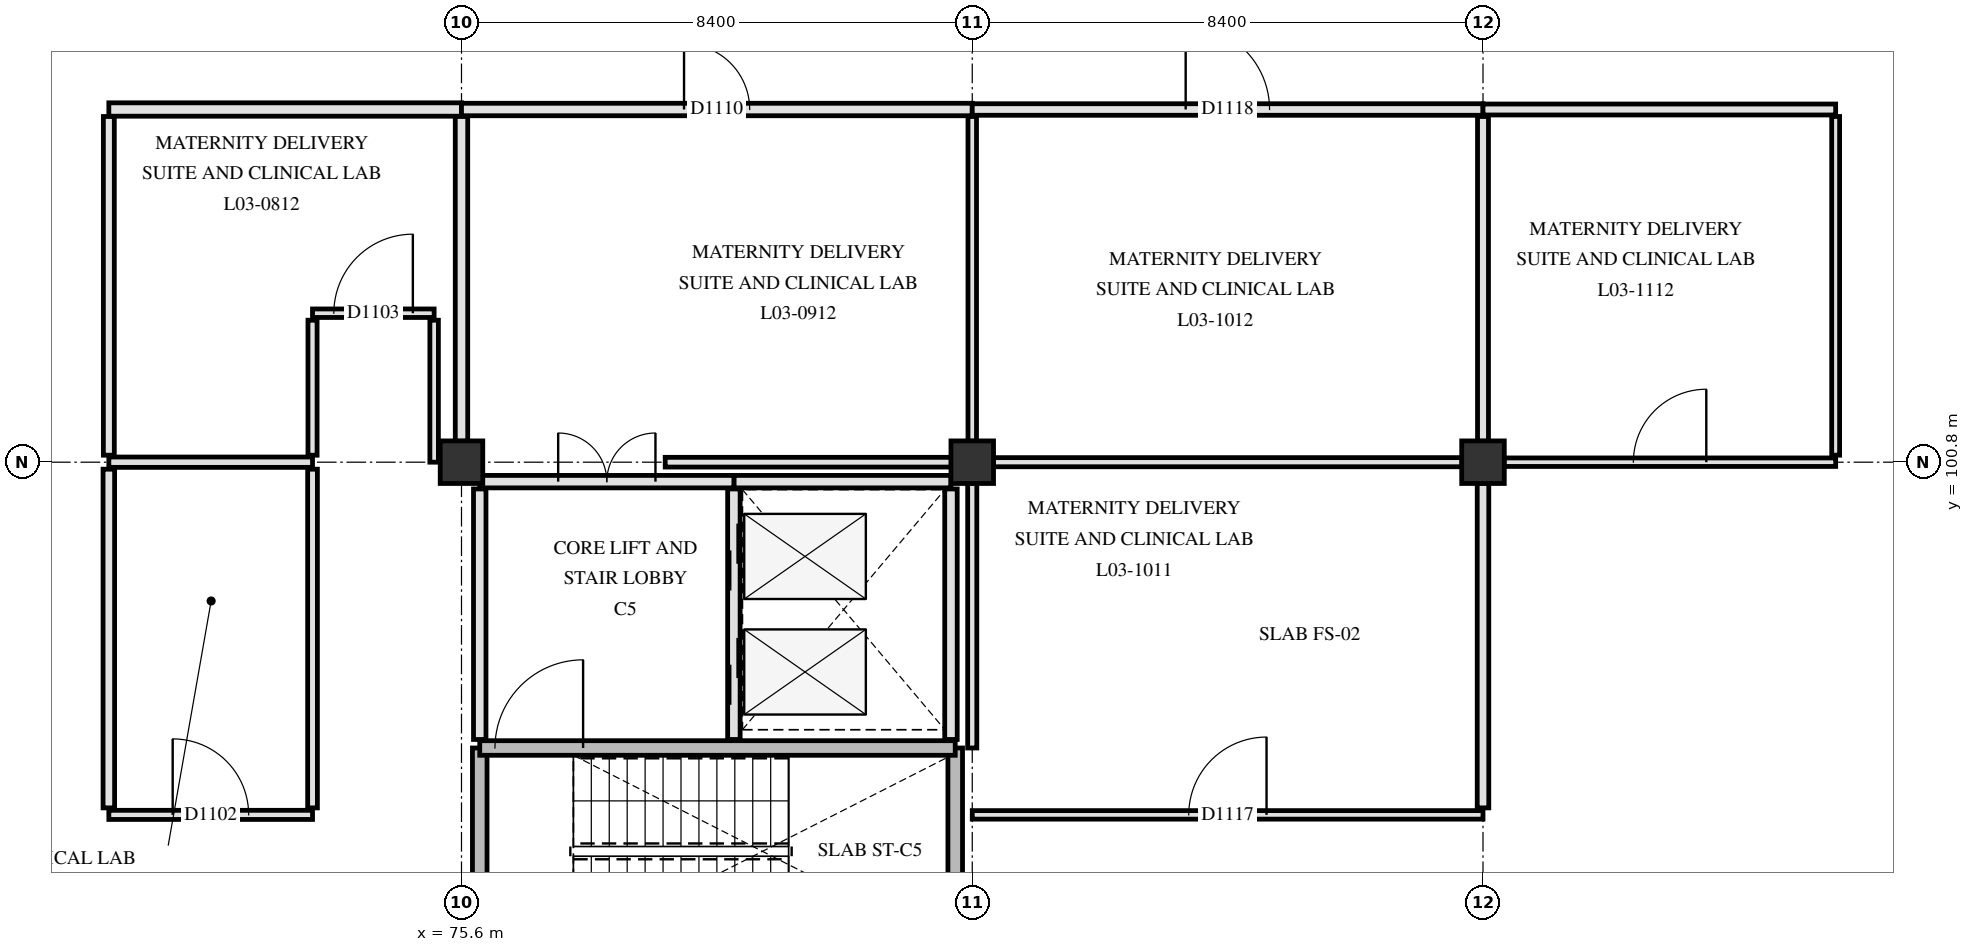
"""IFC4 building model, lengths in metres.
Left out: names, types, materials, properties, quantities, classifications, styles, units other than length and angle.
Written with IfcOpenShell. Run it as: python <this file> out.ifc"""

import sys

from ifc_helpers import new_model, si_unit, direction, frame, frame_2d, origin, origin_2d, place, context, subcontext, project, spatial, rectangle, extrude, element, fill, save


model = new_model("IFC4")
c1 = context("Model", 3, precision=1e-05, world=origin(), true_north=direction((0.0, 1.0)))
c2 = subcontext(c1, "Body", "Model", "MODEL_VIEW")
j1 = project(units=[si_unit("LENGTHUNIT", "METRE"), si_unit("PLANEANGLEUNIT", "RADIAN")], contexts=[c1])
p1 = place(None, origin())
s1 = spatial("IfcSite", under=j1, at=p1, CompositionType="ELEMENT")
p2 = place(p1, origin())
s2 = spatial("IfcBuilding", under=s1, at=p2, CompositionType="ELEMENT")
p3 = place(p2, frame((0.0, 0.0, 14.4)))
s3 = spatial("IfcBuildingStorey", under=s2, at=p3, CompositionType="ELEMENT", Elevation=14.4)
for number, where, z_axis, x_axis in (
    (1, (75.6, 100.8, 0.0), (0.0, 0.0, 1.0), (1.0, 0.0, 0.0)),
    (2, (84.0, 100.8, 0.0), (0.0, 0.0, 1.0), (1.0, 0.0, 0.0)),
    (3, (92.4, 100.8, 0.0), (0.0, 0.0, 1.0), (1.0, 0.0, 0.0)),
):
    element("IfcColumn", number, at=place(p3, frame(where, z_axis=z_axis, x_axis=x_axis)), inside=s3, PredefinedType="COLUMN", context=c2, shape_type="SweptSolid", body=[
        extrude(rectangle(XDim=0.7, YDim=0.7, at=origin_2d()), origin(), (0.0, 0.0, 1.0), 4.2),
    ])
for number, where, z_axis, x_axis in (
    (4, (75.9, 92.78, 0.0), (0.0, 0.0, 1.0), (0.0, 1.0, 0.0)),
    (5, (83.72, 92.78, 0.0), (0.0, 0.0, 1.0), (0.0, 1.0, 0.0)),
):
    element("IfcWall", number, at=place(p3, frame(where, z_axis=z_axis, x_axis=x_axis)), inside=s3, PredefinedType="SHEAR", context=c2, shape_type="SweptSolid", body=[
        extrude(rectangle(XDim=3.32, YDim=0.24, at=frame_2d((1.66, 0.0))), origin(), (0.0, 0.0, 1.0), 3.9),
    ])
p4 = place(p3, frame((75.9, 96.1, 0.0), z_axis=(0.0, 0.0, 1.0), x_axis=(1.0, 0.0, 0.0)))
e6 = element("IfcWall", 6, at=p4, inside=s3, PredefinedType="SHEAR", context=c2, shape_type="SweptSolid", body=[
    extrude(rectangle(XDim=7.82, YDim=0.24, at=frame_2d((3.91, 0.0))), origin(), (0.0, 0.0, 1.0), 3.9),
])
p5 = place(p4, frame((0.25, 0.0, 0.0)))
e7 = element("IfcOpeningElement", 7, at=p5, cuts=e6, PredefinedType="OPENING", context=c2, shape_type="SweptSolid", body=[
    extrude(rectangle(XDim=1.45, YDim=2.2, at=frame_2d((0.725, 1.1))), frame((0.0, 0.13, 0.0), z_axis=(0.0, -1.0, 0.0), x_axis=(1.0, 0.0, 0.0)), (0.0, 0.0, 1.0), 0.26),
])
p6 = place(p3, frame((80.08, 96.24, 0.0), z_axis=(0.0, 0.0, 1.0), x_axis=(0.0, 1.0, 0.0)))
e8 = element("IfcWall", 8, at=p6, inside=s3, PredefinedType="PARTITIONING", context=c2, shape_type="SweptSolid", body=[
    extrude(rectangle(XDim=4.12, YDim=0.205, at=frame_2d((2.06, 0.0))), origin(), (0.0, 0.0, 1.0), 3.89),
])
p7 = place(p6, frame((0.57, 0.0, 0.0)))
e9 = element("IfcOpeningElement", 9, at=p7, cuts=e8, PredefinedType="OPENING", context=c2, shape_type="SweptSolid", body=[
    extrude(rectangle(XDim=1.1, YDim=2.15, at=frame_2d((0.55, 1.075))), frame((0.0, 0.113, 0.0), z_axis=(0.0, -1.0, 0.0), x_axis=(1.0, 0.0, 0.0)), (0.0, 0.0, 1.0), 0.225),
])
p8 = place(p6, frame((2.45, 0.0, 0.0)))
e10 = element("IfcOpeningElement", 10, at=p8, cuts=e8, PredefinedType="OPENING", context=c2, shape_type="SweptSolid", body=[
    extrude(rectangle(XDim=1.1, YDim=2.15, at=frame_2d((0.55, 1.075))), frame((0.0, 0.113, 0.0), z_axis=(0.0, -1.0, 0.0), x_axis=(1.0, 0.0, 0.0)), (0.0, 0.0, 1.0), 0.225),
])
p9 = place(p3, frame((83.65, 96.24, 0.0), z_axis=(0.0, 0.0, 1.0), x_axis=(0.0, 1.0, 0.0)))
e11 = element("IfcWall", 11, at=p9, inside=s3, PredefinedType="PARTITIONING", context=c2, shape_type="SweptSolid", body=[
    extrude(rectangle(XDim=4.12, YDim=0.205, at=frame_2d((2.06, 0.0))), origin(), (0.0, 0.0, 1.0), 3.89),
])
p10 = place(p3, frame((80.08, 100.48, 0.0), z_axis=(0.0, 0.0, 1.0), x_axis=(1.0, 0.0, 0.0)))
e12 = element("IfcWall", 12, at=p10, inside=s3, PredefinedType="PARTITIONING", context=c2, shape_type="SweptSolid", body=[
    extrude(rectangle(XDim=3.57, YDim=0.205, at=frame_2d((1.785, 0.0))), origin(), (0.0, 0.0, 1.0), 3.29),
])
p11 = place(p3, frame((75.9, 96.24, 0.0), z_axis=(0.0, 0.0, 1.0), x_axis=(0.0, 1.0, 0.0)))
e13 = element("IfcWall", 13, at=p11, inside=s3, PredefinedType="PARTITIONING", context=c2, shape_type="SweptSolid", body=[
    extrude(rectangle(XDim=4.12, YDim=0.205, at=frame_2d((2.06, 0.0))), origin(), (0.0, 0.0, 1.0), 3.34),
])
p12 = place(p3, frame((75.9, 100.48, 0.0), z_axis=(0.0, 0.0, 1.0), x_axis=(1.0, 0.0, 0.0)))
e14 = element("IfcWall", 14, at=p12, inside=s3, PredefinedType="PARTITIONING", context=c2, shape_type="SweptSolid", body=[
    extrude(rectangle(XDim=4.18, YDim=0.205, at=frame_2d((2.09, 0.0))), origin(), (0.0, 0.0, 1.0), 3.29),
])
p13 = place(p12, frame((1.29, 0.0, 0.0)))
e15 = element("IfcOpeningElement", 15, at=p13, cuts=e14, PredefinedType="OPENING", context=c2, shape_type="SweptSolid", body=[
    extrude(rectangle(XDim=1.6, YDim=2.25, at=frame_2d((0.8, 1.125))), frame((0.0, 0.113, 0.0), z_axis=(0.0, -1.0, 0.0), x_axis=(1.0, 0.0, 0.0)), (0.0, 0.0, 1.0), 0.225),
])
p14 = place(p3, frame((69.8, 95.0, 0.0), z_axis=(0.0, 0.0, 1.0), x_axis=(1.0, 0.0, 0.0)))
e16 = element("IfcWall", 16, at=p14, inside=s3, PredefinedType="PARTITIONING", context=c2, shape_type="SweptSolid", body=[
    extrude(rectangle(XDim=3.35, YDim=0.15, at=frame_2d((1.675, 0.0))), origin(), (0.0, 0.0, 1.0), 3.89),
])
p15 = place(p14, frame((1.05, 0.0, 0.0)))
e17 = element("IfcOpeningElement", 17, at=p15, cuts=e16, PredefinedType="OPENING", context=c2, shape_type="SweptSolid", body=[
    extrude(rectangle(XDim=1.25, YDim=2.2, at=frame_2d((0.625, 1.1))), frame((0.0, 0.085, 0.0), z_axis=(0.0, -1.0, 0.0), x_axis=(1.0, 0.0, 0.0)), (0.0, 0.0, 1.0), 0.17),
])
p16 = place(p3, frame((84.0, 95.0, 0.0), z_axis=(0.0, 0.0, 1.0), x_axis=(1.0, 0.0, 0.0)))
e18 = element("IfcWall", 18, at=p16, inside=s3, PredefinedType="PARTITIONING", context=c2, shape_type="SweptSolid", body=[
    extrude(rectangle(XDim=8.4, YDim=0.14, at=frame_2d((4.2, 0.0))), origin(), (0.0, 0.0, 1.0), 3.34),
])
p17 = place(p16, frame((3.56, 0.0, 0.0)))
e19 = element("IfcOpeningElement", 19, at=p17, cuts=e18, PredefinedType="OPENING", context=c2, shape_type="SweptSolid", body=[
    extrude(rectangle(XDim=1.28, YDim=2.18, at=frame_2d((0.64, 1.09))), frame((0.0, 0.08, 0.0), z_axis=(0.0, -1.0, 0.0), x_axis=(1.0, 0.0, 0.0)), (0.0, 0.0, 1.0), 0.16),
])
p18 = place(p3, frame((69.8, 100.8, 0.0), z_axis=(0.0, 0.0, 1.0), x_axis=(1.0, 0.0, 0.0)))
e20 = element("IfcWall", 20, at=p18, inside=s3, PredefinedType="PARTITIONING", context=c2, shape_type="SweptSolid", body=[
    extrude(rectangle(XDim=3.35, YDim=0.17, at=frame_2d((1.675, 0.0))), origin(), (0.0, 0.0, 1.0), 3.29),
])
p19 = place(p3, frame((78.95, 100.8, 0.0), z_axis=(0.0, 0.0, 1.0), x_axis=(1.0, 0.0, 0.0)))
e21 = element("IfcWall", 21, at=p19, inside=s3, PredefinedType="PARTITIONING", context=c2, shape_type="SweptSolid", body=[
    extrude(rectangle(XDim=4.705, YDim=0.16, at=frame_2d((2.353, 0.0))), origin(), (0.0, 0.0, 1.0), 3.29),
])
p20 = place(p3, frame((84.345, 100.8, 0.0), z_axis=(0.0, 0.0, 1.0), x_axis=(1.0, 0.0, 0.0)))
e22 = element("IfcWall", 22, at=p20, inside=s3, PredefinedType="PARTITIONING", context=c2, shape_type="SweptSolid", body=[
    extrude(rectangle(XDim=7.71, YDim=0.15, at=frame_2d((3.855, 0.0))), origin(), (0.0, 0.0, 1.0), 3.29),
])
p21 = place(p3, frame((92.745, 100.8, 0.0), z_axis=(0.0, 0.0, 1.0), x_axis=(1.0, 0.0, 0.0)))
e23 = element("IfcWall", 23, at=p21, inside=s3, PredefinedType="PARTITIONING", context=c2, shape_type="SweptSolid", body=[
    extrude(rectangle(XDim=5.455, YDim=0.14, at=frame_2d((2.728, 0.0))), origin(), (0.0, 0.0, 1.0), 3.29),
])
p22 = place(p21, frame((2.127, 0.0, 0.0)))
e24 = element("IfcOpeningElement", 24, at=p22, cuts=e23, PredefinedType="OPENING", context=c2, shape_type="SweptSolid", body=[
    extrude(rectangle(XDim=1.2, YDim=2.15, at=frame_2d((0.6, 1.075))), frame((0.0, 0.08, 0.0), z_axis=(0.0, -1.0, 0.0), x_axis=(1.0, 0.0, 0.0)), (0.0, 0.0, 1.0), 0.16),
])
p23 = place(p3, frame((73.15, 103.25, 0.0), z_axis=(0.0, 0.0, 1.0), x_axis=(1.0, 0.0, 0.0)))
e25 = element("IfcWall", 25, at=p23, inside=s3, PredefinedType="PARTITIONING", context=c2, shape_type="SweptSolid", body=[
    extrude(rectangle(XDim=2.0, YDim=0.14, at=frame_2d((1.0, 0.0))), origin(), (0.0, 0.0, 1.0), 3.89),
])
p24 = place(p23, frame((0.35, 0.0, 0.0)))
e26 = element("IfcOpeningElement", 26, at=p24, cuts=e25, PredefinedType="OPENING", context=c2, shape_type="SweptSolid", body=[
    extrude(rectangle(XDim=1.3, YDim=2.2, at=frame_2d((0.65, 1.1))), frame((0.0, 0.08, 0.0), z_axis=(0.0, -1.0, 0.0), x_axis=(1.0, 0.0, 0.0)), (0.0, 0.0, 1.0), 0.16),
])
p25 = place(p3, frame((69.8, 106.6, 0.0), z_axis=(0.0, 0.0, 1.0), x_axis=(1.0, 0.0, 0.0)))
e27 = element("IfcWall", 27, at=p25, inside=s3, PredefinedType="PARTITIONING", context=c2, shape_type="SweptSolid", body=[
    extrude(rectangle(XDim=5.8, YDim=0.22, at=frame_2d((2.9, 0.0))), origin(), (0.0, 0.0, 1.0), 3.34),
])
p26 = place(p3, frame((75.6, 106.6, 0.0), z_axis=(0.0, 0.0, 1.0), x_axis=(1.0, 0.0, 0.0)))
e28 = element("IfcWall", 28, at=p26, inside=s3, PredefinedType="PARTITIONING", context=c2, shape_type="SweptSolid", body=[
    extrude(rectangle(XDim=8.4, YDim=0.205, at=frame_2d((4.2, 0.0))), origin(), (0.0, 0.0, 1.0), 3.34),
])
p27 = place(p26, frame((3.66, 0.0, 0.0)))
e29 = element("IfcOpeningElement", 29, at=p27, cuts=e28, PredefinedType="OPENING", context=c2, shape_type="SweptSolid", body=[
    extrude(rectangle(XDim=1.08, YDim=2.12, at=frame_2d((0.54, 1.06))), frame((0.0, 0.113, 0.0), z_axis=(0.0, -1.0, 0.0), x_axis=(1.0, 0.0, 0.0)), (0.0, 0.0, 1.0), 0.225),
])
p28 = place(p3, frame((84.0, 106.6, 0.0), z_axis=(0.0, 0.0, 1.0), x_axis=(1.0, 0.0, 0.0)))
e30 = element("IfcWall", 30, at=p28, inside=s3, PredefinedType="PARTITIONING", context=c2, shape_type="SweptSolid", body=[
    extrude(rectangle(XDim=8.4, YDim=0.19, at=frame_2d((4.2, 0.0))), origin(), (0.0, 0.0, 1.0), 3.34),
])
p29 = place(p28, frame((3.51, 0.0, 0.0)))
e31 = element("IfcOpeningElement", 31, at=p29, cuts=e30, PredefinedType="OPENING", context=c2, shape_type="SweptSolid", body=[
    extrude(rectangle(XDim=1.38, YDim=2.22, at=frame_2d((0.69, 1.11))), frame((0.0, 0.105, 0.0), z_axis=(0.0, -1.0, 0.0), x_axis=(1.0, 0.0, 0.0)), (0.0, 0.0, 1.0), 0.21),
])
p30 = place(p3, frame((92.4, 106.6, 0.0), z_axis=(0.0, 0.0, 1.0), x_axis=(1.0, 0.0, 0.0)))
e32 = element("IfcWall", 32, at=p30, inside=s3, PredefinedType="PARTITIONING", context=c2, shape_type="SweptSolid", body=[
    extrude(rectangle(XDim=5.8, YDim=0.18, at=frame_2d((2.9, 0.0))), origin(), (0.0, 0.0, 1.0), 3.34),
])
p31 = place(p3, frame((69.8, 95.115, 0.0), z_axis=(0.0, 0.0, 1.0), x_axis=(0.0, 1.0, 0.0)))
e33 = element("IfcWall", 33, at=p31, inside=s3, PredefinedType="PARTITIONING", context=c2, shape_type="SweptSolid", body=[
    extrude(rectangle(XDim=5.57, YDim=0.19, at=frame_2d((2.785, 0.0))), origin(), (0.0, 0.0, 1.0), 3.29),
])
p32 = place(p3, frame((69.8, 100.915, 0.0), z_axis=(0.0, 0.0, 1.0), x_axis=(0.0, 1.0, 0.0)))
e34 = element("IfcWall", 34, at=p32, inside=s3, PredefinedType="PARTITIONING", context=c2, shape_type="SweptSolid", body=[
    extrude(rectangle(XDim=5.57, YDim=0.18, at=frame_2d((2.785, 0.0))), origin(), (0.0, 0.0, 1.0), 3.29),
])
p33 = place(p3, frame((73.15, 95.115, 0.0), z_axis=(0.0, 0.0, 1.0), x_axis=(0.0, 1.0, 0.0)))
e35 = element("IfcWall", 35, at=p33, inside=s3, PredefinedType="PARTITIONING", context=c2, shape_type="SweptSolid", body=[
    extrude(rectangle(XDim=5.57, YDim=0.16, at=frame_2d((2.785, 0.0))), origin(), (0.0, 0.0, 1.0), 3.29),
])
p34 = place(p3, frame((73.15, 100.915, 0.0), z_axis=(0.0, 0.0, 1.0), x_axis=(0.0, 1.0, 0.0)))
e36 = element("IfcWall", 36, at=p34, inside=s3, PredefinedType="PARTITIONING", context=c2, shape_type="SweptSolid", body=[
    extrude(rectangle(XDim=2.22, YDim=0.15, at=frame_2d((1.11, 0.0))), origin(), (0.0, 0.0, 1.0), 3.29),
])
p35 = place(p3, frame((75.15, 100.8, 0.0), z_axis=(0.0, 0.0, 1.0), x_axis=(0.0, 1.0, 0.0)))
e37 = element("IfcWall", 37, at=p35, inside=s3, PredefinedType="PARTITIONING", context=c2, shape_type="SweptSolid", body=[
    extrude(rectangle(XDim=2.335, YDim=0.14, at=frame_2d((1.167, 0.0))), origin(), (0.0, 0.0, 1.0), 3.29),
])
p36 = place(p3, frame((75.6, 101.145, 0.0), z_axis=(0.0, 0.0, 1.0), x_axis=(0.0, 1.0, 0.0)))
e38 = element("IfcWall", 38, at=p36, inside=s3, PredefinedType="PARTITIONING", context=c2, shape_type="SweptSolid", body=[
    extrude(rectangle(XDim=5.34, YDim=0.205, at=frame_2d((2.67, 0.0))), origin(), (0.0, 0.0, 1.0), 3.34),
])
p37 = place(p3, frame((84.0, 96.1, 0.0), z_axis=(0.0, 0.0, 1.0), x_axis=(0.0, 1.0, 0.0)))
e39 = element("IfcWall", 39, at=p37, inside=s3, PredefinedType="PARTITIONING", context=c2, shape_type="SweptSolid", body=[
    extrude(rectangle(XDim=4.355, YDim=0.15, at=frame_2d((2.177, 0.0))), origin(), (0.0, 0.0, 1.0), 3.34),
])
p38 = place(p3, frame((84.0, 101.145, 0.0), z_axis=(0.0, 0.0, 1.0), x_axis=(0.0, 1.0, 0.0)))
e40 = element("IfcWall", 40, at=p38, inside=s3, PredefinedType="PARTITIONING", context=c2, shape_type="SweptSolid", body=[
    extrude(rectangle(XDim=5.34, YDim=0.14, at=frame_2d((2.67, 0.0))), origin(), (0.0, 0.0, 1.0), 3.34),
])
p39 = place(p3, frame((92.4, 95.115, 0.0), z_axis=(0.0, 0.0, 1.0), x_axis=(0.0, 1.0, 0.0)))
e41 = element("IfcWall", 41, at=p39, inside=s3, PredefinedType="PARTITIONING", context=c2, shape_type="SweptSolid", body=[
    extrude(rectangle(XDim=5.34, YDim=0.19, at=frame_2d((2.67, 0.0))), origin(), (0.0, 0.0, 1.0), 3.34),
])
p40 = place(p3, frame((92.4, 101.145, 0.0), z_axis=(0.0, 0.0, 1.0), x_axis=(0.0, 1.0, 0.0)))
e42 = element("IfcWall", 42, at=p40, inside=s3, PredefinedType="PARTITIONING", context=c2, shape_type="SweptSolid", body=[
    extrude(rectangle(XDim=5.34, YDim=0.18, at=frame_2d((2.67, 0.0))), origin(), (0.0, 0.0, 1.0), 3.34),
])
p41 = place(p3, frame((98.2, 100.915, 0.0), z_axis=(0.0, 0.0, 1.0), x_axis=(0.0, 1.0, 0.0)))
e43 = element("IfcWall", 43, at=p41, inside=s3, PredefinedType="PARTITIONING", context=c2, shape_type="SweptSolid", body=[
    extrude(rectangle(XDim=5.57, YDim=0.13, at=frame_2d((2.785, 0.0))), origin(), (0.0, 0.0, 1.0), 3.29),
])
p42 = place(p5, origin())
e44 = element("IfcDoor", 44, at=p42, inside=s3, OperationType="SINGLE_SWING_RIGHT", PredefinedType="DOOR", context=c2, shape_type="SweptSolid", body=[
    extrude(rectangle(XDim=1.45, YDim=2.2, at=frame_2d((0.725, 1.1))), frame((0.0, 0.025, 0.0), z_axis=(0.0, -1.0, 0.0), x_axis=(1.0, 0.0, 0.0)), (0.0, 0.0, 1.0), 0.05),
])
fill(e7, e44)
p43 = place(p7, origin())
e45 = element("IfcDoor", 45, at=p43, inside=s3, OperationType="SLIDING_TO_LEFT", PredefinedType="DOOR", context=c2, shape_type="SweptSolid", body=[
    extrude(rectangle(XDim=1.1, YDim=2.15, at=frame_2d((0.55, 1.075))), frame((0.0, 0.025, 0.0), z_axis=(0.0, -1.0, 0.0), x_axis=(1.0, 0.0, 0.0)), (0.0, 0.0, 1.0), 0.05),
])
fill(e9, e45)
p44 = place(p8, origin())
e46 = element("IfcDoor", 46, at=p44, inside=s3, OperationType="SLIDING_TO_LEFT", PredefinedType="DOOR", context=c2, shape_type="SweptSolid", body=[
    extrude(rectangle(XDim=1.1, YDim=2.15, at=frame_2d((0.55, 1.075))), frame((0.0, 0.025, 0.0), z_axis=(0.0, -1.0, 0.0), x_axis=(1.0, 0.0, 0.0)), (0.0, 0.0, 1.0), 0.05),
])
fill(e10, e46)
p45 = place(p13, origin())
e47 = element("IfcDoor", 47, at=p45, inside=s3, OperationType="DOUBLE_SWING_LEFT", PredefinedType="DOOR", context=c2, shape_type="SweptSolid", body=[
    extrude(rectangle(XDim=1.6, YDim=2.25, at=frame_2d((0.8, 1.125))), frame((0.0, 0.025, 0.0), z_axis=(0.0, -1.0, 0.0), x_axis=(1.0, 0.0, 0.0)), (0.0, 0.0, 1.0), 0.05),
])
fill(e15, e47)
p46 = place(p15, origin())
e48 = element("IfcDoor", 48, at=p46, inside=s3, OperationType="SINGLE_SWING_LEFT", PredefinedType="DOOR", context=c2, shape_type="SweptSolid", body=[
    extrude(rectangle(XDim=1.25, YDim=2.2, at=frame_2d((0.625, 1.1))), frame((0.0, 0.025, 0.0), z_axis=(0.0, -1.0, 0.0), x_axis=(1.0, 0.0, 0.0)), (0.0, 0.0, 1.0), 0.05),
])
fill(e17, e48)
p47 = place(p24, origin())
e49 = element("IfcDoor", 49, at=p47, inside=s3, OperationType="SINGLE_SWING_RIGHT", PredefinedType="DOOR", context=c2, shape_type="SweptSolid", body=[
    extrude(rectangle(XDim=1.3, YDim=2.2, at=frame_2d((0.65, 1.1))), frame((0.0, 0.025, 0.0), z_axis=(0.0, -1.0, 0.0), x_axis=(1.0, 0.0, 0.0)), (0.0, 0.0, 1.0), 0.05),
])
fill(e26, e49)
p48 = place(p27, origin())
e50 = element("IfcDoor", 50, at=p48, inside=s3, OperationType="SINGLE_SWING_LEFT", PredefinedType="DOOR", context=c2, shape_type="SweptSolid", body=[
    extrude(rectangle(XDim=1.08, YDim=2.12, at=frame_2d((0.54, 1.06))), frame((0.0, 0.025, 0.0), z_axis=(0.0, -1.0, 0.0), x_axis=(1.0, 0.0, 0.0)), (0.0, 0.0, 1.0), 0.05),
])
fill(e29, e50)
p49 = place(p17, origin())
e51 = element("IfcDoor", 51, at=p49, inside=s3, OperationType="SINGLE_SWING_RIGHT", PredefinedType="DOOR", context=c2, shape_type="SweptSolid", body=[
    extrude(rectangle(XDim=1.28, YDim=2.18, at=frame_2d((0.64, 1.09))), frame((0.0, 0.025, 0.0), z_axis=(0.0, -1.0, 0.0), x_axis=(1.0, 0.0, 0.0)), (0.0, 0.0, 1.0), 0.05),
])
fill(e19, e51)
p50 = place(p29, origin())
e52 = element("IfcDoor", 52, at=p50, inside=s3, OperationType="SINGLE_SWING_LEFT", PredefinedType="DOOR", context=c2, shape_type="SweptSolid", body=[
    extrude(rectangle(XDim=1.38, YDim=2.22, at=frame_2d((0.69, 1.11))), frame((0.0, 0.025, 0.0), z_axis=(0.0, -1.0, 0.0), x_axis=(1.0, 0.0, 0.0)), (0.0, 0.0, 1.0), 0.05),
])
fill(e31, e52)
p51 = place(p22, origin())
e53 = element("IfcDoor", 53, at=p51, inside=s3, OperationType="SINGLE_SWING_RIGHT", PredefinedType="DOOR", context=c2, shape_type="SweptSolid", body=[
    extrude(rectangle(XDim=1.2, YDim=2.15, at=frame_2d((0.6, 1.075))), frame((0.0, 0.025, 0.0), z_axis=(0.0, -1.0, 0.0), x_axis=(1.0, 0.0, 0.0)), (0.0, 0.0, 1.0), 0.05),
])
fill(e24, e53)
save(model, sys.argv[1])
